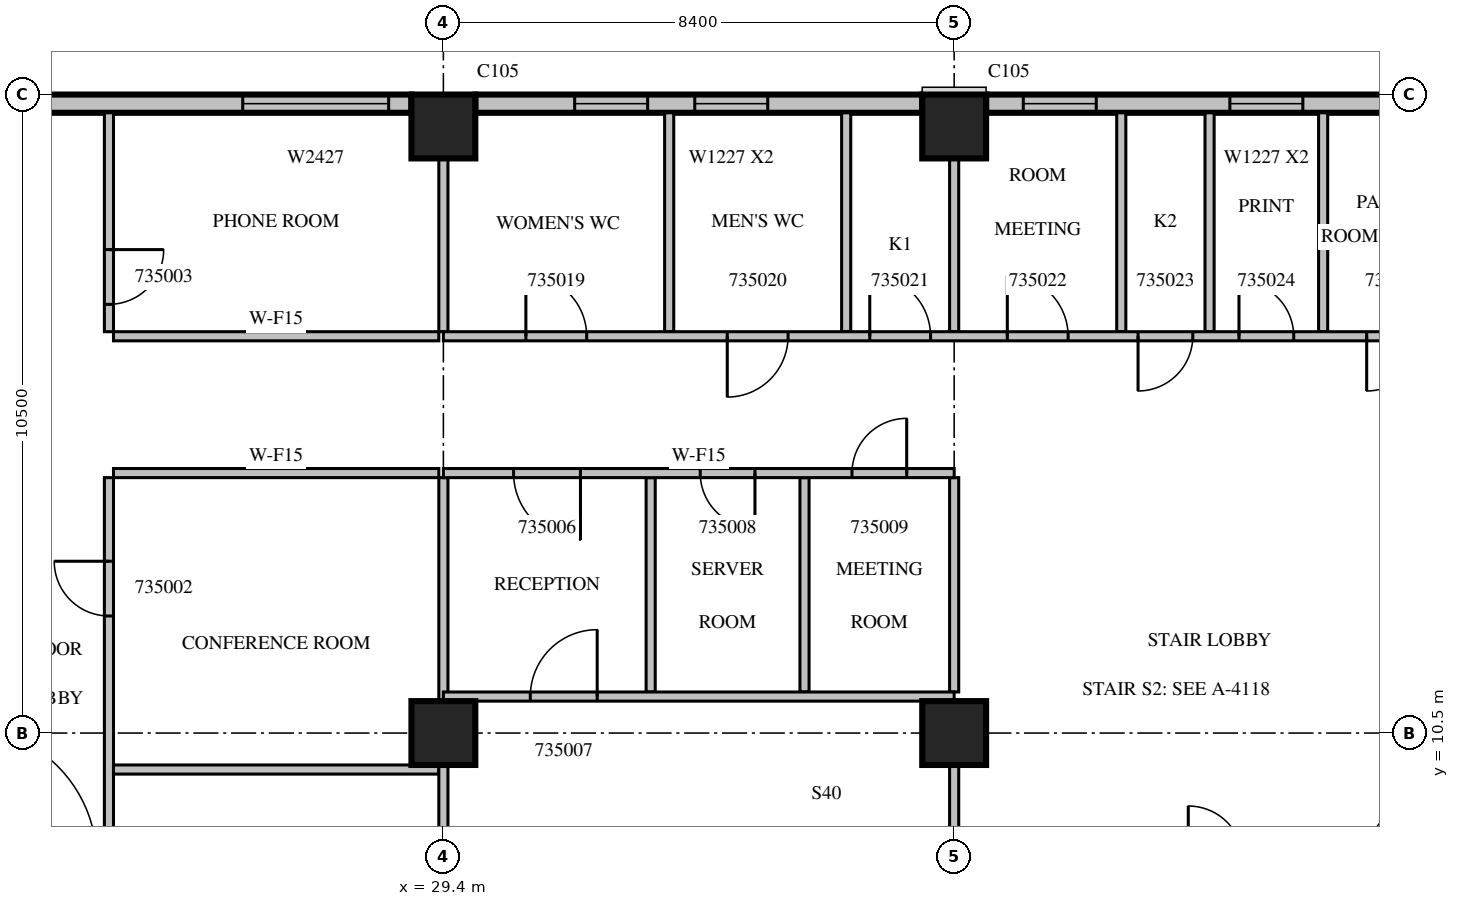
"""IFC4 building model, lengths in metres.
Left out: names, types, materials, properties, quantities, classifications, styles, units other than length and angle.
Written with IfcOpenShell. Run it as: python <this file> out.ifc"""

import sys

from ifc_helpers import new_model, si_unit, direction, frame, frame_2d, origin, origin_2d, place, context, subcontext, project, spatial, rectangle, extrude, source, transform, mapped, element, fill, save


model = new_model("IFC4")
c1 = context("Model", 3, precision=1e-05, world=origin(), true_north=direction((0.0, 1.0)))
c2 = subcontext(c1, "Body", "Model", "MODEL_VIEW")
j1 = project(units=[si_unit("LENGTHUNIT", "METRE"), si_unit("PLANEANGLEUNIT", "RADIAN")], contexts=[c1])
p1 = place(None, origin())
s1 = spatial("IfcSite", under=j1, at=p1, CompositionType="ELEMENT")
p2 = place(p1, origin())
s2 = spatial("IfcBuilding", under=s1, at=p2, CompositionType="ELEMENT")
p3 = place(p2, frame((0.0, 0.0, 158.1)))
s3 = spatial("IfcBuildingStorey", under=s2, at=p3, CompositionType="ELEMENT", Elevation=158.1)
m1 = source(origin(), c2, "Body", "SweptSolid", [
    extrude(rectangle(XDim=1.05, YDim=1.05, at=origin_2d()), origin(), (0.0, 0.0, 1.0), 4.2),
])
for number, where, z_axis, x_axis in (
    (1, (29.4, 10.5, 0.0), (0.0, 0.0, 1.0), (1.0, 0.0, 0.0)),
    (2, (37.8, 10.5, 0.0), (0.0, 0.0, 1.0), (1.0, 0.0, 0.0)),
    (3, (29.4, 20.475, 0.0), (0.0, 0.0, 1.0), (1.0, 0.0, 0.0)),
    (4, (37.8, 20.475, 0.0), (0.0, 0.0, 1.0), (1.0, 0.0, 0.0)),
):
    element("IfcColumn", number, at=place(p3, frame(where, z_axis=z_axis, x_axis=x_axis)), inside=s3, PredefinedType="COLUMN", context=c2, shape_type="MappedRepresentation", body=[
        mapped(m1, transform((0.0, 0.0, 0.0), scale=1.0)),
    ])
m2 = source(origin(), c2, "Body", "SweptSolid", [
    extrude(rectangle(XDim=7.35, YDim=0.3, at=frame_2d((3.675, 0.0))), origin(), (0.0, 0.0, 1.0), 3.8),
])
p4 = place(p3, frame((45.675, 20.85, 0.0), z_axis=(0.0, 0.0, 1.0), x_axis=(-1.0, 0.0, 0.0)))
e5 = element("IfcWall", 5, at=p4, inside=s3, PredefinedType="STANDARD", context=c2, shape_type="MappedRepresentation", body=[
    mapped(m2, transform((0.0, 0.0, 0.0), scale=1.0)),
])
m3 = source(origin(), c2, "Body", "SweptSolid", [
    extrude(rectangle(XDim=1.2, YDim=2.7, at=frame_2d((0.6, 1.35))), frame((0.0, 0.16, 0.0), z_axis=(0.0, -1.0, 0.0), x_axis=(1.0, 0.0, 0.0)), (0.0, 0.0, 1.0), 0.32),
])
p5 = place(p4, frame((2.141, 0.0, 0.6)))
e6 = element("IfcOpeningElement", 6, at=p5, cuts=e5, PredefinedType="OPENING", context=c2, shape_type="MappedRepresentation", body=[
    mapped(m3, transform((0.0, 0.0, 0.0), scale=1.0)),
])
p6 = place(p4, frame((5.538, 0.0, 0.6)))
e7 = element("IfcOpeningElement", 7, at=p6, cuts=e5, PredefinedType="OPENING", context=c2, shape_type="MappedRepresentation", body=[
    mapped(m3, transform((0.0, 0.0, 0.0), scale=1.0)),
])
p7 = place(p3, frame((37.275, 20.85, 0.0), z_axis=(0.0, 0.0, 1.0), x_axis=(-1.0, 0.0, 0.0)))
e8 = element("IfcWall", 8, at=p7, inside=s3, PredefinedType="STANDARD", context=c2, shape_type="MappedRepresentation", body=[
    mapped(m2, transform((0.0, 0.0, 0.0), scale=1.0)),
])
p8 = place(p7, frame((2.541, 0.0, 0.6)))
e9 = element("IfcOpeningElement", 9, at=p8, cuts=e8, PredefinedType="OPENING", context=c2, shape_type="MappedRepresentation", body=[
    mapped(m3, transform((0.0, 0.0, 0.0), scale=1.0)),
])
p9 = place(p7, frame((4.516, 0.0, 0.6)))
e10 = element("IfcOpeningElement", 10, at=p9, cuts=e8, PredefinedType="OPENING", context=c2, shape_type="MappedRepresentation", body=[
    mapped(m3, transform((0.0, 0.0, 0.0), scale=1.0)),
])
m4 = source(origin(), c2, "Body", "SweptSolid", [
    extrude(rectangle(XDim=6.875, YDim=0.3, at=frame_2d((3.438, 0.0))), origin(), (0.0, 0.0, 1.0), 3.8),
])
p10 = place(p3, frame((28.875, 20.85, 0.0), z_axis=(0.0, 0.0, 1.0), x_axis=(-1.0, 0.0, 0.0)))
e11 = element("IfcWall", 11, at=p10, inside=s3, PredefinedType="STANDARD", context=c2, shape_type="MappedRepresentation", body=[
    mapped(m4, transform((0.0, 0.0, 0.0), scale=1.0)),
])
m5 = source(origin(), c2, "Body", "SweptSolid", [
    extrude(rectangle(XDim=2.4, YDim=2.7, at=frame_2d((1.2, 1.35))), frame((0.0, 0.16, 0.0), z_axis=(0.0, -1.0, 0.0), x_axis=(1.0, 0.0, 0.0)), (0.0, 0.0, 1.0), 0.32),
])
p11 = place(p10, frame((0.375, 0.0, 0.6)))
e12 = element("IfcOpeningElement", 12, at=p11, cuts=e11, PredefinedType="OPENING", context=c2, shape_type="MappedRepresentation", body=[
    mapped(m5, transform((0.0, 0.0, 0.0), scale=1.0)),
])
m6 = source(origin(), c2, "Body", "SweptSolid", [
    extrude(rectangle(XDim=11.425, YDim=0.15, at=frame_2d((5.713, 0.0))), origin(), (0.0, 0.0, 1.0), 3.8),
])
p12 = place(p3, frame((23.9, 14.7, 0.0), z_axis=(0.0, 0.0, 1.0), x_axis=(0.0, -1.0, 0.0)))
e13 = element("IfcWall", 13, at=p12, inside=s3, PredefinedType="PARTITIONING", context=c2, shape_type="MappedRepresentation", body=[
    mapped(m6, transform((0.0, 0.0, 0.0), scale=1.0)),
])
m7 = source(origin(), c2, "Body", "SweptSolid", [
    extrude(rectangle(XDim=0.9, YDim=2.1, at=frame_2d((0.45, 1.05))), frame((0.0, 0.085, 0.0), z_axis=(0.0, -1.0, 0.0), x_axis=(1.0, 0.0, 0.0)), (0.0, 0.0, 1.0), 0.17),
])
p13 = place(p12, frame((7.963, 0.0, 0.0)))
e14 = element("IfcOpeningElement", 14, at=p13, cuts=e13, PredefinedType="OPENING", context=c2, shape_type="MappedRepresentation", body=[
    mapped(m7, transform((0.0, 0.0, 0.0), scale=1.0)),
])
p14 = place(p12, frame((1.375, 0.0, 0.0)))
e15 = element("IfcOpeningElement", 15, at=p14, cuts=e13, PredefinedType="OPENING", context=c2, shape_type="MappedRepresentation", body=[
    mapped(m7, transform((0.0, 0.0, 0.0), scale=1.0)),
])
m8 = source(origin(), c2, "Body", "SweptSolid", [
    extrude(rectangle(XDim=3.6, YDim=0.15, at=frame_2d((1.8, 0.0))), origin(), (0.0, 0.0, 1.0), 3.8),
])
p15 = place(p3, frame((23.9, 20.7, 0.0), z_axis=(0.0, 0.0, 1.0), x_axis=(0.0, -1.0, 0.0)))
e16 = element("IfcWall", 16, at=p15, inside=s3, PredefinedType="PARTITIONING", context=c2, shape_type="MappedRepresentation", body=[
    mapped(m8, transform((0.0, 0.0, 0.0), scale=1.0)),
])
p16 = place(p15, frame((2.25, 0.0, 0.0)))
e17 = element("IfcOpeningElement", 17, at=p16, cuts=e16, PredefinedType="OPENING", context=c2, shape_type="MappedRepresentation", body=[
    mapped(m7, transform((0.0, 0.0, 0.0), scale=1.0)),
])
m9 = source(origin(), c2, "Body", "SweptSolid", [
    extrude(rectangle(XDim=5.35, YDim=0.15, at=frame_2d((2.675, 0.0))), origin(), (0.0, 0.0, 1.0), 3.8),
])
for number, where, z_axis, x_axis in (
    (18, (29.325, 9.9, 0.0), (0.0, 0.0, 1.0), (-1.0, 0.0, 0.0)),
    (19, (29.325, 14.775, 0.0), (0.0, 0.0, 1.0), (-1.0, 0.0, 0.0)),
    (20, (23.975, 17.025, 0.0), (0.0, 0.0, 1.0), (1.0, 0.0, 0.0)),
):
    element("IfcWall", number, at=place(p3, frame(where, z_axis=z_axis, x_axis=x_axis)), inside=s3, PredefinedType="PARTITIONING", context=c2, shape_type="MappedRepresentation", body=[
        mapped(m9, transform((0.0, 0.0, 0.0), scale=1.0)),
    ])
m10 = source(origin(), c2, "Body", "SweptSolid", [
    extrude(rectangle(XDim=6.701, YDim=0.15, at=frame_2d((3.35, 0.0))), origin(), (0.0, 0.0, 1.0), 3.8),
])
p17 = place(p3, frame((29.4, 3.275, 0.0), z_axis=(0.0, 0.0, 1.0), x_axis=(0.0, 1.0, 0.0)))
e21 = element("IfcWall", 21, at=p17, inside=s3, PredefinedType="PARTITIONING", context=c2, shape_type="MappedRepresentation", body=[
    mapped(m10, transform((0.0, 0.0, 0.0), scale=1.0)),
])
m11 = source(origin(), c2, "Body", "SweptSolid", [
    extrude(rectangle(XDim=3.676, YDim=0.15, at=frame_2d((1.838, 0.0))), origin(), (0.0, 0.0, 1.0), 3.8),
])
p18 = place(p3, frame((29.4, 11.024, 0.0), z_axis=(0.0, 0.0, 1.0), x_axis=(0.0, 1.0, 0.0)))
e22 = element("IfcWall", 22, at=p18, inside=s3, PredefinedType="PARTITIONING", context=c2, shape_type="MappedRepresentation", body=[
    mapped(m11, transform((0.0, 0.0, 0.0), scale=1.0)),
])
m12 = source(origin(), c2, "Body", "SweptSolid", [
    extrude(rectangle(XDim=2.851, YDim=0.15, at=frame_2d((1.425, 0.0))), origin(), (0.0, 0.0, 1.0), 3.8),
])
p19 = place(p3, frame((29.4, 17.1, 0.0), z_axis=(0.0, 0.0, 1.0), x_axis=(0.0, 1.0, 0.0)))
e23 = element("IfcWall", 23, at=p19, inside=s3, PredefinedType="PARTITIONING", context=c2, shape_type="MappedRepresentation", body=[
    mapped(m12, transform((0.0, 0.0, 0.0), scale=1.0)),
])
m13 = source(origin(), c2, "Body", "SweptSolid", [
    extrude(rectangle(XDim=3.525, YDim=0.15, at=frame_2d((1.762, 0.0))), origin(), (0.0, 0.0, 1.0), 3.8),
])
for number, where, z_axis, x_axis in (
    (24, (32.809, 11.175, 0.0), (0.0, 0.0, 1.0), (0.0, 1.0, 0.0)),
    (25, (35.339, 11.175, 0.0), (0.0, 0.0, 1.0), (0.0, 1.0, 0.0)),
):
    element("IfcWall", number, at=place(p3, frame(where, z_axis=z_axis, x_axis=x_axis)), inside=s3, PredefinedType="PARTITIONING", context=c2, shape_type="MappedRepresentation", body=[
        mapped(m13, transform((0.0, 0.0, 0.0), scale=1.0)),
    ])
m14 = source(origin(), c2, "Body", "SweptSolid", [
    extrude(rectangle(XDim=8.927, YDim=0.15, at=frame_2d((4.463, 0.0))), origin(), (0.0, 0.0, 1.0), 3.8),
])
p20 = place(p3, frame((37.8, 1.049, 0.0), z_axis=(0.0, 0.0, 1.0), x_axis=(0.0, 1.0, 0.0)))
e26 = element("IfcWall", 26, at=p20, inside=s3, PredefinedType="PARTITIONING", context=c2, shape_type="MappedRepresentation", body=[
    mapped(m14, transform((0.0, 0.0, 0.0), scale=1.0)),
])
p21 = place(p3, frame((37.8, 11.175, 0.0), z_axis=(0.0, 0.0, 1.0), x_axis=(0.0, 1.0, 0.0)))
e27 = element("IfcWall", 27, at=p21, inside=s3, PredefinedType="PARTITIONING", context=c2, shape_type="MappedRepresentation", body=[
    mapped(m13, transform((0.0, 0.0, 0.0), scale=1.0)),
])
m15 = source(origin(), c2, "Body", "SweptSolid", [
    extrude(rectangle(XDim=8.4, YDim=0.15, at=frame_2d((4.2, 0.0))), origin(), (0.0, 0.0, 1.0), 3.8),
])
p22 = place(p3, frame((37.8, 11.1, 0.0), z_axis=(0.0, 0.0, 1.0), x_axis=(-1.0, 0.0, 0.0)))
e28 = element("IfcWall", 28, at=p22, inside=s3, PredefinedType="PARTITIONING", context=c2, shape_type="MappedRepresentation", body=[
    mapped(m15, transform((0.0, 0.0, 0.0), scale=1.0)),
])
m16 = source(origin(), c2, "Body", "SweptSolid", [
    extrude(rectangle(XDim=1.1, YDim=2.1, at=frame_2d((0.55, 1.05))), frame((0.0, 0.085, 0.0), z_axis=(0.0, -1.0, 0.0), x_axis=(1.0, 0.0, 0.0)), (0.0, 0.0, 1.0), 0.17),
])
p23 = place(p22, frame((5.871, 0.0, 0.0)))
e29 = element("IfcOpeningElement", 29, at=p23, cuts=e28, PredefinedType="OPENING", context=c2, shape_type="MappedRepresentation", body=[
    mapped(m16, transform((0.0, 0.0, 0.0), scale=1.0)),
])
for number, where, z_axis, x_axis in (
    (30, (33.113, 20.7, 0.0), (0.0, 0.0, 1.0), (0.0, -1.0, 0.0)),
    (31, (36.024, 20.7, 0.0), (0.0, 0.0, 1.0), (0.0, -1.0, 0.0)),
    (32, (40.548, 20.7, 0.0), (0.0, 0.0, 1.0), (0.0, -1.0, 0.0)),
    (33, (43.868, 20.7, 0.0), (0.0, 0.0, 1.0), (0.0, -1.0, 0.0)),
):
    element("IfcWall", number, at=place(p3, frame(where, z_axis=z_axis, x_axis=x_axis)), inside=s3, PredefinedType="PARTITIONING", context=c2, shape_type="MappedRepresentation", body=[
        mapped(m8, transform((0.0, 0.0, 0.0), scale=1.0)),
    ])
p24 = place(p3, frame((37.8, 17.1, 0.0), z_axis=(0.0, 0.0, 1.0), x_axis=(0.0, 1.0, 0.0)))
e34 = element("IfcWall", 34, at=p24, inside=s3, PredefinedType="PARTITIONING", context=c2, shape_type="MappedRepresentation", body=[
    mapped(m12, transform((0.0, 0.0, 0.0), scale=1.0)),
])
p25 = place(p3, frame((42.0, 17.1, 0.0), z_axis=(0.0, 0.0, 1.0), x_axis=(0.0, 1.0, 0.0)))
e35 = element("IfcWall", 35, at=p25, inside=s3, PredefinedType="PARTITIONING", context=c2, shape_type="MappedRepresentation", body=[
    mapped(m8, transform((0.0, 0.0, 0.0), scale=1.0)),
])
p26 = place(p3, frame((37.8, 14.775, 0.0), z_axis=(0.0, 0.0, 1.0), x_axis=(-1.0, 0.0, 0.0)))
e36 = element("IfcWall", 36, at=p26, inside=s3, PredefinedType="PARTITIONING", context=c2, shape_type="MappedRepresentation", body=[
    mapped(m15, transform((0.0, 0.0, 0.0), scale=1.0)),
])
p27 = place(p26, frame((6.146, 0.0, 0.0)))
e37 = element("IfcOpeningElement", 37, at=p27, cuts=e36, PredefinedType="OPENING", context=c2, shape_type="MappedRepresentation", body=[
    mapped(m16, transform((0.0, 0.0, 0.0), scale=1.0)),
])
p28 = place(p26, frame((3.276, 0.0, 0.0)))
e38 = element("IfcOpeningElement", 38, at=p28, cuts=e36, PredefinedType="OPENING", context=c2, shape_type="MappedRepresentation", body=[
    mapped(m7, transform((0.0, 0.0, 0.0), scale=1.0)),
])
p29 = place(p26, frame((0.781, 0.0, 0.0)))
e39 = element("IfcOpeningElement", 39, at=p29, cuts=e36, PredefinedType="OPENING", context=c2, shape_type="MappedRepresentation", body=[
    mapped(m7, transform((0.0, 0.0, 0.0), scale=1.0)),
])
m17 = source(origin(), c2, "Body", "SweptSolid", [
    extrude(rectangle(XDim=37.5, YDim=0.15, at=frame_2d((18.75, 0.0))), origin(), (0.0, 0.0, 1.0), 3.8),
])
p30 = place(p3, frame((29.4, 17.025, 0.0), z_axis=(0.0, 0.0, 1.0), x_axis=(1.0, 0.0, 0.0)))
e40 = element("IfcWall", 40, at=p30, inside=s3, PredefinedType="PARTITIONING", context=c2, shape_type="MappedRepresentation", body=[
    mapped(m17, transform((0.0, 0.0, 0.0), scale=1.0)),
])
m18 = source(origin(), c2, "Body", "SweptSolid", [
    extrude(rectangle(XDim=1.0, YDim=2.1, at=frame_2d((0.5, 1.05))), frame((0.0, 0.085, 0.0), z_axis=(0.0, -1.0, 0.0), x_axis=(1.0, 0.0, 0.0)), (0.0, 0.0, 1.0), 0.17),
])
p31 = place(p30, frame((1.357, 0.0, 0.0)))
e41 = element("IfcOpeningElement", 41, at=p31, cuts=e40, PredefinedType="OPENING", context=c2, shape_type="MappedRepresentation", body=[
    mapped(m18, transform((0.0, 0.0, 0.0), scale=1.0)),
])
p32 = place(p30, frame((4.669, 0.0, 0.0)))
e42 = element("IfcOpeningElement", 42, at=p32, cuts=e40, PredefinedType="OPENING", context=c2, shape_type="MappedRepresentation", body=[
    mapped(m18, transform((0.0, 0.0, 0.0), scale=1.0)),
])
p33 = place(p30, frame((7.012, 0.0, 0.0)))
e43 = element("IfcOpeningElement", 43, at=p33, cuts=e40, PredefinedType="OPENING", context=c2, shape_type="MappedRepresentation", body=[
    mapped(m18, transform((0.0, 0.0, 0.0), scale=1.0)),
])
p34 = place(p30, frame((9.274, 0.0, 0.0)))
e44 = element("IfcOpeningElement", 44, at=p34, cuts=e40, PredefinedType="OPENING", context=c2, shape_type="MappedRepresentation", body=[
    mapped(m18, transform((0.0, 0.0, 0.0), scale=1.0)),
])
p35 = place(p30, frame((11.424, 0.0, 0.0)))
e45 = element("IfcOpeningElement", 45, at=p35, cuts=e40, PredefinedType="OPENING", context=c2, shape_type="MappedRepresentation", body=[
    mapped(m7, transform((0.0, 0.0, 0.0), scale=1.0)),
])
p36 = place(p30, frame((13.084, 0.0, 0.0)))
e46 = element("IfcOpeningElement", 46, at=p36, cuts=e40, PredefinedType="OPENING", context=c2, shape_type="MappedRepresentation", body=[
    mapped(m7, transform((0.0, 0.0, 0.0), scale=1.0)),
])
p37 = place(p30, frame((15.184, 0.0, 0.0)))
e47 = element("IfcOpeningElement", 47, at=p37, cuts=e40, PredefinedType="OPENING", context=c2, shape_type="MappedRepresentation", body=[
    mapped(m7, transform((0.0, 0.0, 0.0), scale=1.0)),
])
p38 = place(p30, frame((18.228, 0.0, 0.0)))
e48 = element("IfcOpeningElement", 48, at=p38, cuts=e40, PredefinedType="OPENING", context=c2, shape_type="MappedRepresentation", body=[
    mapped(m18, transform((0.0, 0.0, 0.0), scale=1.0)),
])
p39 = place(p30, frame((21.218, 0.0, 0.0)))
e49 = element("IfcOpeningElement", 49, at=p39, cuts=e40, PredefinedType="OPENING", context=c2, shape_type="MappedRepresentation", body=[
    mapped(m7, transform((0.0, 0.0, 0.0), scale=1.0)),
])
p40 = place(p30, frame((25.954, 0.0, 0.0)))
e50 = element("IfcOpeningElement", 50, at=p40, cuts=e40, PredefinedType="OPENING", context=c2, shape_type="MappedRepresentation", body=[
    mapped(m7, transform((0.0, 0.0, 0.0), scale=1.0)),
])
p41 = place(p30, frame((33.401, 0.0, 0.0)))
e51 = element("IfcOpeningElement", 51, at=p41, cuts=e40, PredefinedType="OPENING", context=c2, shape_type="MappedRepresentation", body=[
    mapped(m7, transform((0.0, 0.0, 0.0), scale=1.0)),
])
m19 = source(origin(), c2, "Body", "SweptSolid", [
    extrude(rectangle(XDim=1.2, YDim=2.7, at=frame_2d((0.6, 1.35))), frame((0.0, 0.03, 0.0), z_axis=(0.0, -1.0, 0.0), x_axis=(1.0, 0.0, 0.0)), (0.0, 0.0, 1.0), 0.06),
])
p42 = place(p8, origin())
e52 = element("IfcWindow", 52, at=p42, inside=s3, PartitioningType="SINGLE_PANEL", PredefinedType="WINDOW", context=c2, shape_type="MappedRepresentation", body=[
    mapped(m19, transform((0.0, 0.0, 0.0), scale=1.0)),
])
fill(e9, e52)
p43 = place(p9, origin())
e53 = element("IfcWindow", 53, at=p43, inside=s3, PartitioningType="SINGLE_PANEL", PredefinedType="WINDOW", context=c2, shape_type="MappedRepresentation", body=[
    mapped(m19, transform((0.0, 0.0, 0.0), scale=1.0)),
])
fill(e10, e53)
m20 = source(origin(), c2, "Body", "SweptSolid", [
    extrude(rectangle(XDim=2.4, YDim=2.7, at=frame_2d((1.2, 1.35))), frame((0.0, 0.03, 0.0), z_axis=(0.0, -1.0, 0.0), x_axis=(1.0, 0.0, 0.0)), (0.0, 0.0, 1.0), 0.06),
])
p44 = place(p11, origin())
e54 = element("IfcWindow", 54, at=p44, inside=s3, PartitioningType="SINGLE_PANEL", PredefinedType="WINDOW", context=c2, shape_type="MappedRepresentation", body=[
    mapped(m20, transform((0.0, 0.0, 0.0), scale=1.0)),
])
fill(e12, e54)
p45 = place(p5, origin())
e55 = element("IfcWindow", 55, at=p45, inside=s3, PartitioningType="SINGLE_PANEL", PredefinedType="WINDOW", context=c2, shape_type="MappedRepresentation", body=[
    mapped(m19, transform((0.0, 0.0, 0.0), scale=1.0)),
])
fill(e6, e55)
p46 = place(p6, origin())
e56 = element("IfcWindow", 56, at=p46, inside=s3, PartitioningType="SINGLE_PANEL", PredefinedType="WINDOW", context=c2, shape_type="MappedRepresentation", body=[
    mapped(m19, transform((0.0, 0.0, 0.0), scale=1.0)),
])
fill(e7, e56)
m21 = source(origin(), c2, "Body", "SweptSolid", [
    extrude(rectangle(XDim=0.9, YDim=2.1, at=frame_2d((0.45, 1.05))), frame((0.0, 0.025, 0.0), z_axis=(0.0, -1.0, 0.0), x_axis=(1.0, 0.0, 0.0)), (0.0, 0.0, 1.0), 0.05),
])
p47 = place(p14, origin())
e57 = element("IfcDoor", 57, at=p47, inside=s3, OperationType="SINGLE_SWING_RIGHT", PredefinedType="DOOR", context=c2, shape_type="MappedRepresentation", body=[
    mapped(m21, transform((0.0, 0.0, 0.0), scale=1.0)),
])
fill(e15, e57)
p48 = place(p16, origin())
e58 = element("IfcDoor", 58, at=p48, inside=s3, OperationType="SINGLE_SWING_LEFT", PredefinedType="DOOR", context=c2, shape_type="MappedRepresentation", body=[
    mapped(m21, transform((0.0, 0.0, 0.0), scale=1.0)),
])
fill(e17, e58)
m22 = source(origin(), c2, "Body", "SweptSolid", [
    extrude(rectangle(XDim=1.1, YDim=2.1, at=frame_2d((0.55, 1.05))), frame((0.0, 0.025, 0.0), z_axis=(0.0, -1.0, 0.0), x_axis=(1.0, 0.0, 0.0)), (0.0, 0.0, 1.0), 0.05),
])
p49 = place(p27, origin())
e59 = element("IfcDoor", 59, at=p49, inside=s3, OperationType="SINGLE_SWING_LEFT", PredefinedType="DOOR", context=c2, shape_type="MappedRepresentation", body=[
    mapped(m22, transform((0.0, 0.0, 0.0), scale=1.0)),
])
fill(e37, e59)
p50 = place(p23, origin())
e60 = element("IfcDoor", 60, at=p50, inside=s3, OperationType="SINGLE_SWING_RIGHT", PredefinedType="DOOR", context=c2, shape_type="MappedRepresentation", body=[
    mapped(m22, transform((0.0, 0.0, 0.0), scale=1.0)),
])
fill(e29, e60)
p51 = place(p28, origin())
e61 = element("IfcDoor", 61, at=p51, inside=s3, OperationType="SINGLE_SWING_LEFT", PredefinedType="DOOR", context=c2, shape_type="MappedRepresentation", body=[
    mapped(m21, transform((0.0, 0.0, 0.0), scale=1.0)),
])
fill(e38, e61)
p52 = place(p29, origin())
e62 = element("IfcDoor", 62, at=p52, inside=s3, OperationType="SINGLE_SWING_RIGHT", PredefinedType="DOOR", context=c2, shape_type="MappedRepresentation", body=[
    mapped(m21, transform((0.0, 0.0, 0.0), scale=1.0)),
])
fill(e39, e62)
m23 = source(origin(), c2, "Body", "SweptSolid", [
    extrude(rectangle(XDim=1.0, YDim=2.1, at=frame_2d((0.5, 1.05))), frame((0.0, 0.025, 0.0), z_axis=(0.0, -1.0, 0.0), x_axis=(1.0, 0.0, 0.0)), (0.0, 0.0, 1.0), 0.05),
])
p53 = place(p31, origin())
e63 = element("IfcDoor", 63, at=p53, inside=s3, OperationType="SINGLE_SWING_LEFT", PredefinedType="DOOR", context=c2, shape_type="MappedRepresentation", body=[
    mapped(m23, transform((0.0, 0.0, 0.0), scale=1.0)),
])
fill(e41, e63)
p54 = place(p32, origin())
e64 = element("IfcDoor", 64, at=p54, inside=s3, OperationType="SINGLE_SWING_RIGHT", PredefinedType="DOOR", context=c2, shape_type="MappedRepresentation", body=[
    mapped(m23, transform((0.0, 0.0, 0.0), scale=1.0)),
])
fill(e42, e64)
p55 = place(p33, origin())
e65 = element("IfcDoor", 65, at=p55, inside=s3, OperationType="SINGLE_SWING_LEFT", PredefinedType="DOOR", context=c2, shape_type="MappedRepresentation", body=[
    mapped(m23, transform((0.0, 0.0, 0.0), scale=1.0)),
])
fill(e43, e65)
p56 = place(p34, origin())
e66 = element("IfcDoor", 66, at=p56, inside=s3, OperationType="SINGLE_SWING_LEFT", PredefinedType="DOOR", context=c2, shape_type="MappedRepresentation", body=[
    mapped(m23, transform((0.0, 0.0, 0.0), scale=1.0)),
])
fill(e44, e66)
p57 = place(p35, origin())
e67 = element("IfcDoor", 67, at=p57, inside=s3, OperationType="SINGLE_SWING_RIGHT", PredefinedType="DOOR", context=c2, shape_type="MappedRepresentation", body=[
    mapped(m21, transform((0.0, 0.0, 0.0), scale=1.0)),
])
fill(e45, e67)
p58 = place(p36, origin())
e68 = element("IfcDoor", 68, at=p58, inside=s3, OperationType="SINGLE_SWING_LEFT", PredefinedType="DOOR", context=c2, shape_type="MappedRepresentation", body=[
    mapped(m21, transform((0.0, 0.0, 0.0), scale=1.0)),
])
fill(e46, e68)
p59 = place(p37, origin())
e69 = element("IfcDoor", 69, at=p59, inside=s3, OperationType="SINGLE_SWING_RIGHT", PredefinedType="DOOR", context=c2, shape_type="MappedRepresentation", body=[
    mapped(m21, transform((0.0, 0.0, 0.0), scale=1.0)),
])
fill(e47, e69)
save(model, sys.argv[1])
